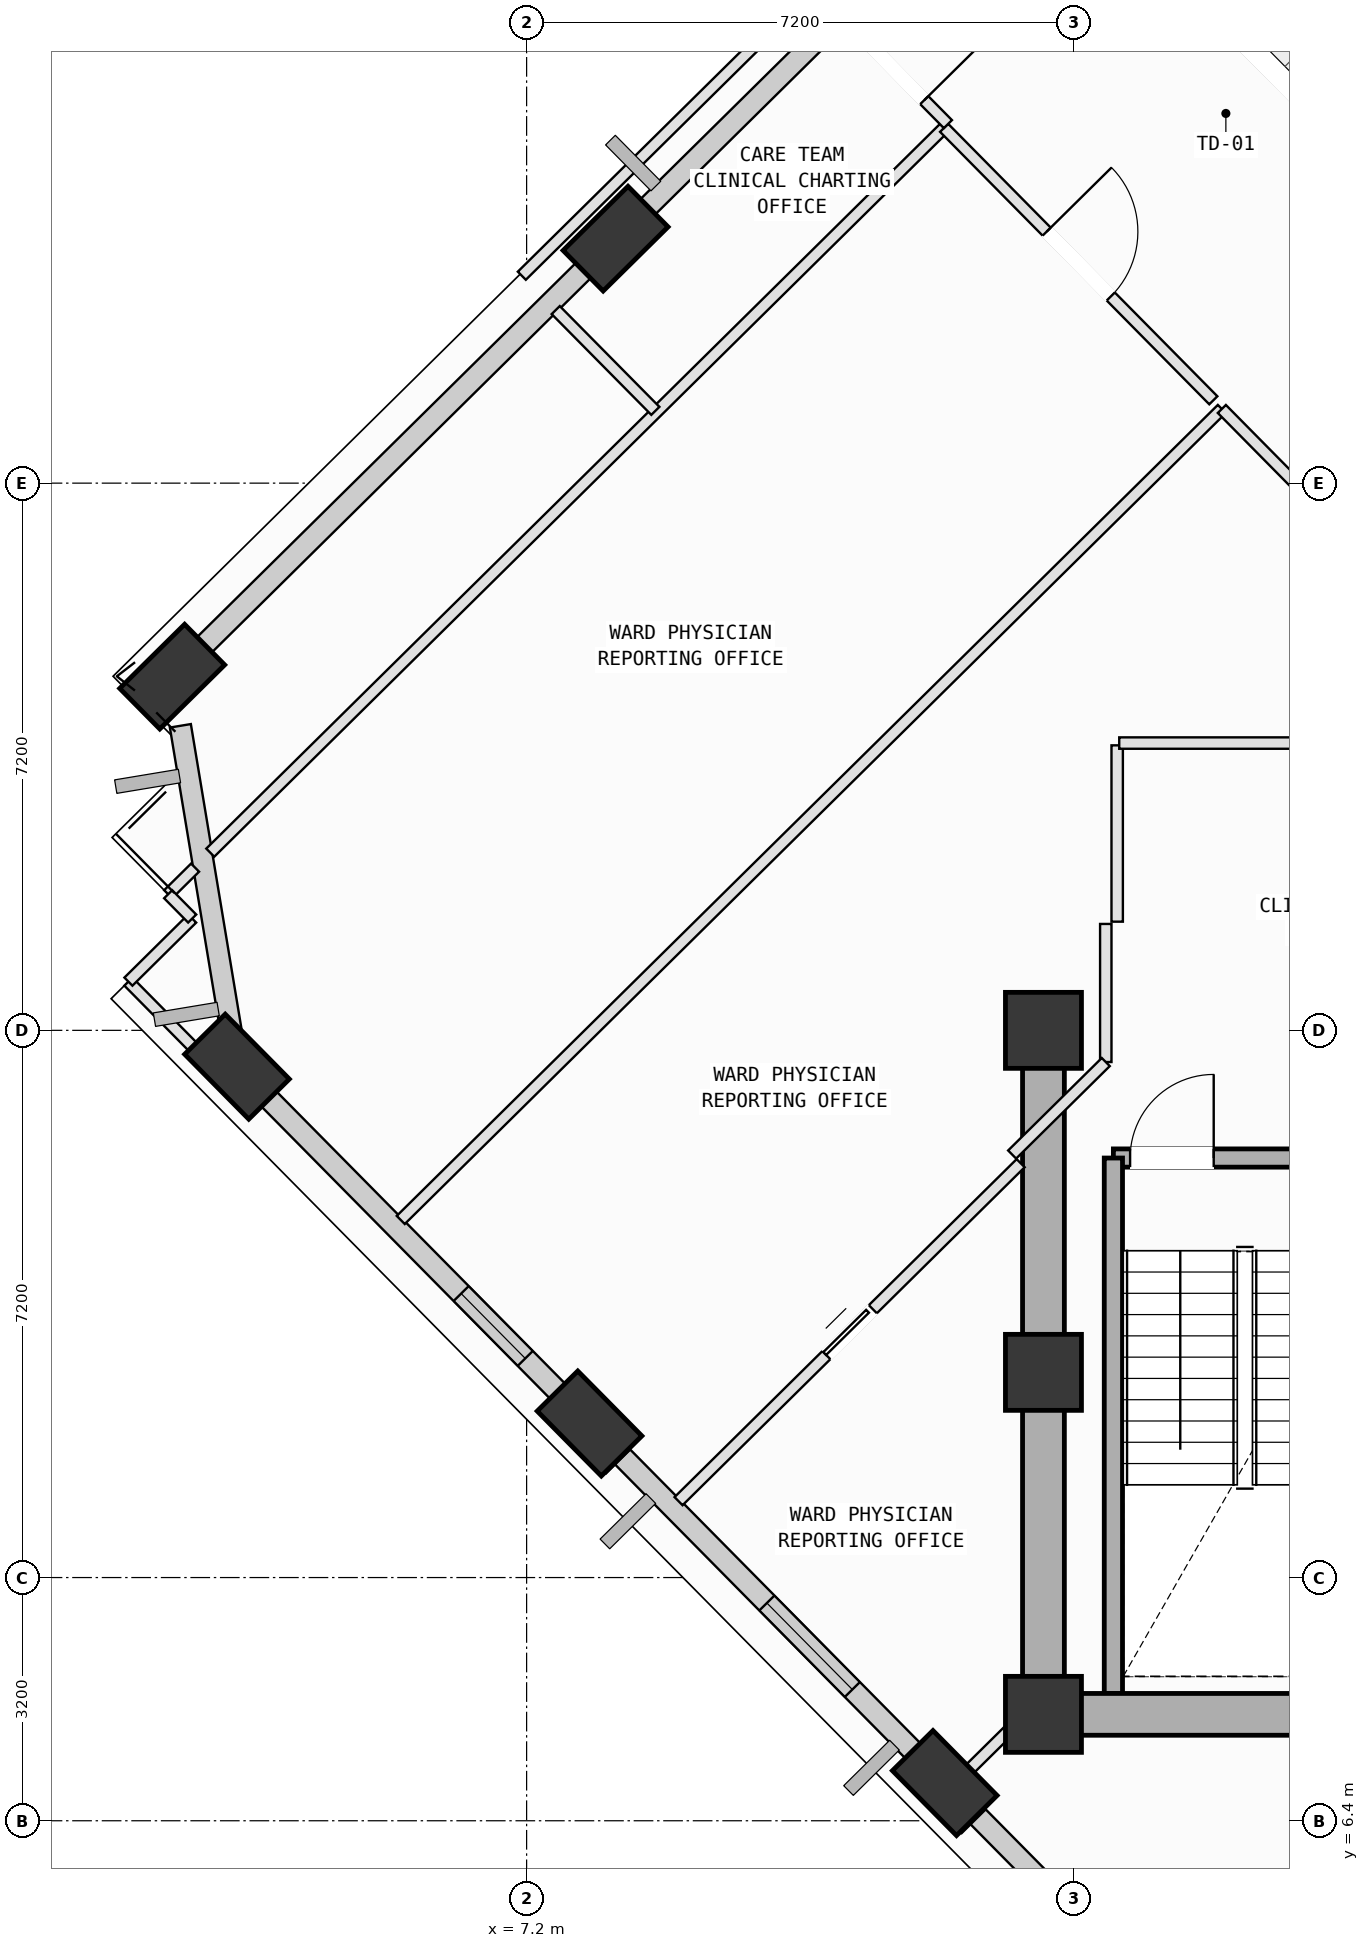
"""IFC4 building model, lengths in metres.
Left out: names, types, materials, properties, quantities, classifications, styles, units other than length and angle.
Written with IfcOpenShell. Run it as: python <this file> out.ifc"""

import sys

from ifc_helpers import new_model, si_unit, direction, frame, frame_2d, origin, origin_2d, place, context, subcontext, project, spatial, rectangle, extrude, element, fill, save


model = new_model("IFC4")
c1 = context("Model", 3, precision=1e-05, world=origin(), true_north=direction((0.0, 1.0)))
c2 = subcontext(c1, "Body", "Model", "MODEL_VIEW")
j1 = project(units=[si_unit("LENGTHUNIT", "METRE"), si_unit("PLANEANGLEUNIT", "RADIAN")], contexts=[c1])
p1 = place(None, origin())
s1 = spatial("IfcSite", under=j1, at=p1, CompositionType="ELEMENT")
p2 = place(p1, origin())
s2 = spatial("IfcBuilding", under=s1, at=p2, CompositionType="ELEMENT")
p3 = place(p2, frame((0.0, 0.0, 215.2)))
s3 = spatial("IfcBuildingStorey", under=s2, at=p3, CompositionType="ELEMENT", Elevation=215.2)
for number, where, z_axis, x_axis in (
    (1, (14.0, 7.8, 0.0), (0.0, 0.0, 1.0), (1.0, 0.0, 0.0)),
    (2, (14.0, 12.3, 0.0), (0.0, 0.0, 1.0), (1.0, 0.0, 0.0)),
    (3, (14.0, 16.8, 0.0), (0.0, 0.0, 1.0), (1.0, 0.0, 0.0)),
):
    element("IfcColumn", number, at=place(p3, frame(where, z_axis=z_axis, x_axis=x_axis)), inside=s3, PredefinedType="COLUMN", context=c2, shape_type="SweptSolid", body=[
        extrude(rectangle(XDim=1.0, YDim=1.0, at=origin_2d()), origin(), (0.0, 0.0, 1.0), 4.0),
    ])
p4 = place(p3, frame((8.371, 27.217, 0.002), z_axis=(-0.009113457738, -0.104136443749, 0.994521264716), x_axis=(0.769637431424, 0.634240685776, 0.073464118158)))
e4 = element("IfcColumn", 4, at=p4, inside=s3, PredefinedType="COLUMN", context=c2, shape_type="SweptSolid", body=[
    extrude(rectangle(XDim=1.2, YDim=0.75, at=origin_2d()), origin(), (0.0, 0.0, 1.0), 4.018),
])
p5 = place(p3, frame((2.537, 21.454, 0.002), z_axis=(0.014782864541, -0.127532499424, 0.991724219986), x_axis=(0.626431108804, 0.77423718396, 0.090226652922)))
e5 = element("IfcColumn", 5, at=p5, inside=s3, PredefinedType="COLUMN", context=c2, shape_type="SweptSolid", body=[
    extrude(rectangle(XDim=1.2, YDim=0.75, at=origin_2d()), origin(), (0.0, 0.0, 1.0), 4.03),
])
p6 = place(p3, frame((3.39, 16.322, 0.002), z_axis=(0.035863862528, -0.123887835929, 0.991647915075), x_axis=(-0.871227434349, 0.482228099616, 0.091754114781)))
e6 = element("IfcColumn", 6, at=p6, inside=s3, PredefinedType="COLUMN", context=c2, shape_type="SweptSolid", body=[
    extrude(rectangle(XDim=1.2, YDim=0.75, at=origin_2d()), origin(), (0.0, 0.0, 1.0), 4.03),
])
p7 = place(p3, frame((8.028, 11.627, 0.002), z_axis=(0.055080788667, -0.104762689458, 0.992970737543), x_axis=(-0.950778623185, 0.298211129608, 0.084202920807)))
e7 = element("IfcColumn", 7, at=p7, inside=s3, PredefinedType="COLUMN", context=c2, shape_type="SweptSolid", body=[
    extrude(rectangle(XDim=1.2, YDim=0.75, at=origin_2d()), origin(), (0.0, 0.0, 1.0), 4.025),
])
p8 = place(p3, frame((12.701, 6.896, 0.002), z_axis=(0.074475583784, -0.085461794595, 0.993554059468), x_axis=(-0.994199115032, 0.071165005168, 0.080645283244)))
e8 = element("IfcColumn", 8, at=p8, inside=s3, PredefinedType="COLUMN", context=c2, shape_type="SweptSolid", body=[
    extrude(rectangle(XDim=1.2, YDim=0.75, at=origin_2d()), origin(), (0.0, 0.0, 1.0), 4.022),
])
p9 = place(p3, frame((15.802, 30.665, 0.0), z_axis=(0.0, 0.0, 1.0), x_axis=(0.702761539953, -0.711425483071, 0.0)))
e9 = element("IfcWall", 9, at=p9, inside=s3, PredefinedType="SOLIDWALL", context=c2, shape_type="SweptSolid", body=[
    extrude(rectangle(XDim=6.96, YDim=0.24, at=frame_2d((3.48, 0.0))), origin(), (0.0, 0.0, 1.0), 3.265),
])
p10 = place(p9, frame((1.151, 0.0, 0.0)))
e10 = element("IfcOpeningElement", 10, at=p10, cuts=e9, PredefinedType="OPENING", context=c2, shape_type="SweptSolid", body=[
    extrude(rectangle(XDim=1.1, YDim=2.15, at=frame_2d((0.55, 1.075))), frame((0.0, 0.13, 0.0), z_axis=(0.0, -1.0, 0.0), x_axis=(1.0, 0.0, 0.0)), (0.0, 0.0, 1.0), 0.26),
])
p11 = place(p3, frame((8.522, 27.367, 0.0), z_axis=(0.0, 0.0, 1.0), x_axis=(0.711412048905, 0.702775139481, 0.0)))
e11 = element("IfcWall", 11, at=p11, inside=s3, PredefinedType="SOLIDWALL", context=c2, shape_type="SweptSolid", body=[
    extrude(rectangle(XDim=7.434, YDim=0.28, at=frame_2d((3.717, 0.0))), origin(), (0.0, 0.0, 1.0), 3.265),
])
p12 = place(p3, frame((2.666, 21.582, 0.0), z_axis=(0.0, 0.0, 1.0), x_axis=(0.711415560766, 0.702771584443, 0.0)))
e12 = element("IfcWall", 12, at=p12, inside=s3, PredefinedType="SOLIDWALL", context=c2, shape_type="SweptSolid", body=[
    extrude(rectangle(XDim=7.485, YDim=0.28, at=frame_2d((3.742, 0.0))), origin(), (0.0, 0.0, 1.0), 3.265),
])
p13 = place(p3, frame((3.367, 16.458, 0.0), z_axis=(0.0, 0.0, 1.0), x_axis=(-0.163887019376, 0.986479115278, 0.0)))
e13 = element("IfcWall", 13, at=p13, inside=s3, PredefinedType="SOLIDWALL", context=c2, shape_type="SweptSolid", body=[
    extrude(rectangle(XDim=4.408, YDim=0.28, at=frame_2d((2.204, 0.0))), origin(), (0.0, 0.0, 1.0), 3.265),
])
p14 = place(p3, frame((7.913, 11.743, 0.0), z_axis=(0.0, 0.0, 1.0), x_axis=(-0.702759613108, 0.711427386445, 0.0)))
e14 = element("IfcWall", 14, at=p14, inside=s3, PredefinedType="SOLIDWALL", context=c2, shape_type="SweptSolid", body=[
    extrude(rectangle(XDim=5.831, YDim=0.28, at=frame_2d((2.915, 0.0))), origin(), (0.0, 0.0, 1.0), 3.265),
])
p15 = place(p14, frame((1.04, 0.0, 0.75)))
e15 = element("IfcOpeningElement", 15, at=p15, cuts=e14, PredefinedType="OPENING", context=c2, shape_type="SweptSolid", body=[
    extrude(rectangle(XDim=1.2, YDim=1.75, at=frame_2d((0.6, 0.875))), frame((0.0, 0.15, 0.0), z_axis=(0.0, -1.0, 0.0), x_axis=(1.0, 0.0, 0.0)), (0.0, 0.0, 1.0), 0.3),
])
p16 = place(p3, frame((12.582, 7.017, 0.0), z_axis=(0.0, 0.0, 1.0), x_axis=(-0.702761134533, 0.711425883554, 0.0)))
e16 = element("IfcWall", 16, at=p16, inside=s3, PredefinedType="SOLIDWALL", context=c2, shape_type="SweptSolid", body=[
    extrude(rectangle(XDim=5.861, YDim=0.28, at=frame_2d((2.93, 0.0))), origin(), (0.0, 0.0, 1.0), 3.265),
])
p17 = place(p16, frame((1.56, 0.0, 0.75)))
e17 = element("IfcOpeningElement", 17, at=p17, cuts=e16, PredefinedType="OPENING", context=c2, shape_type="SweptSolid", body=[
    extrude(rectangle(XDim=1.6, YDim=1.95, at=frame_2d((0.8, 0.975))), frame((0.0, 0.15, 0.0), z_axis=(0.0, -1.0, 0.0), x_axis=(1.0, 0.0, 0.0)), (0.0, 0.0, 1.0), 0.3),
])
p18 = place(p3, frame((18.452, 1.074, 0.0), z_axis=(0.0, 0.0, 1.0), x_axis=(-0.702781594426, 0.711405672269, 0.0)))
e18 = element("IfcWall", 18, at=p18, inside=s3, PredefinedType="SOLIDWALL", context=c2, shape_type="SweptSolid", body=[
    extrude(rectangle(XDim=7.559, YDim=0.28, at=frame_2d((3.779, 0.0))), origin(), (0.0, 0.0, 1.0), 3.265),
])
p19 = place(p18, frame((4.406, 0.0, 0.75)))
e19 = element("IfcOpeningElement", 19, at=p19, cuts=e18, PredefinedType="OPENING", context=c2, shape_type="SweptSolid", body=[
    extrude(rectangle(XDim=2.0, YDim=1.95, at=frame_2d((1.0, 0.975))), frame((0.0, 0.15, 0.0), z_axis=(0.0, -1.0, 0.0), x_axis=(1.0, 0.0, 0.0)), (0.0, 0.0, 1.0), 0.3),
])
p20 = place(p3, frame((14.92, 15.12, 0.0), z_axis=(0.0, 0.0, 1.0), x_axis=(1.0, 0.0, 0.0)))
e20 = element("IfcWall", 20, at=p20, inside=s3, PredefinedType="SOLIDWALL", context=c2, shape_type="SweptSolid", body=[
    extrude(rectangle(XDim=3.46, YDim=0.24, at=frame_2d((1.73, 0.0))), origin(), (0.0, 0.0, 1.0), 3.78),
])
p21 = place(p20, frame((0.22, 0.0, 0.0)))
e21 = element("IfcOpeningElement", 21, at=p21, cuts=e20, PredefinedType="OPENING", context=c2, shape_type="SweptSolid", body=[
    extrude(rectangle(XDim=1.1, YDim=2.15, at=frame_2d((0.55, 1.075))), frame((0.0, 0.13, 0.0), z_axis=(0.0, -1.0, 0.0), x_axis=(1.0, 0.0, 0.0)), (0.0, 0.0, 1.0), 0.26),
])
p22 = place(p3, frame((14.92, 8.075, 0.0), z_axis=(0.0, 0.0, 1.0), x_axis=(0.0, 1.0, 0.0)))
e22 = element("IfcWall", 22, at=p22, inside=s3, PredefinedType="SOLIDWALL", context=c2, shape_type="SweptSolid", body=[
    extrude(rectangle(XDim=7.045, YDim=0.24, at=frame_2d((3.522, 0.0))), origin(), (0.0, 0.0, 1.0), 3.78),
])
p23 = place(p3, frame((14.0, 7.8, 0.0), z_axis=(0.0, 0.0, 1.0), x_axis=(1.0, 0.0, 0.0)))
e23 = element("IfcWall", 23, at=p23, inside=s3, PredefinedType="SHEAR", context=c2, shape_type="SweptSolid", body=[
    extrude(rectangle(XDim=10.8, YDim=0.55, at=frame_2d((5.4, 0.0))), origin(), (0.0, 0.0, 1.0), 3.78),
])
p24 = place(p3, frame((14.0, 16.8, 0.0), z_axis=(0.0, 0.0, 1.0), x_axis=(0.0, -1.0, 0.0)))
e24 = element("IfcWall", 24, at=p24, inside=s3, PredefinedType="SHEAR", context=c2, shape_type="SweptSolid", body=[
    extrude(rectangle(XDim=9.0, YDim=0.55, at=frame_2d((4.5, 0.0))), origin(), (0.0, 0.0, 1.0), 3.78),
])
p25 = place(p3, frame((12.977, 6.29, 0.0), z_axis=(0.0, 0.0, 1.0), x_axis=(-0.703375424574, 0.71081855076, 0.0)))
e25 = element("IfcWall", 25, at=p25, inside=s3, PredefinedType="PARTITIONING", context=c2, shape_type="SweptSolid", body=[
    extrude(rectangle(XDim=0.525, YDim=0.15, at=frame_2d((0.262, 0.0))), origin(), (0.0, 0.0, 1.0), 3.265),
])
p26 = place(p3, frame((12.608, 6.663, 0.0), z_axis=(0.0, 0.0, 1.0), x_axis=(0.711387834121, 0.702799651013, 0.0)))
e26 = element("IfcWall", 26, at=p26, inside=s3, PredefinedType="PARTITIONING", context=c2, shape_type="SweptSolid", body=[
    extrude(rectangle(XDim=1.535, YDim=0.15, at=frame_2d((0.768, 0.0))), origin(), (0.0, 0.0, 1.0), 3.78),
])
p27 = place(p3, frame((9.199, 10.605, 0.0), z_axis=(0.0, 0.0, 1.0), x_axis=(0.71135759635, 0.702830256971, 0.0)))
e27 = element("IfcWall", 27, at=p27, inside=s3, PredefinedType="PARTITIONING", context=c2, shape_type="SweptSolid", body=[
    extrude(rectangle(XDim=6.327, YDim=0.15, at=frame_2d((3.164, 0.0))), origin(), (0.0, 0.0, 1.0), 3.78),
])
p28 = place(p27, frame((2.734, 0.0, 0.0)))
e28 = element("IfcOpeningElement", 28, at=p28, cuts=e27, PredefinedType="OPENING", context=c2, shape_type="SweptSolid", body=[
    extrude(rectangle(XDim=0.86, YDim=2.06, at=frame_2d((0.43, 1.03))), frame((0.0, 0.085, 0.0), z_axis=(0.0, -1.0, 0.0), x_axis=(1.0, 0.0, 0.0)), (0.0, 0.0, 1.0), 0.17),
])
p29 = place(p3, frame((14.97, 20.55, 0.0), z_axis=(0.0, 0.0, 1.0), x_axis=(0.0, -1.0, 0.0)))
e29 = element("IfcWall", 29, at=p29, inside=s3, PredefinedType="PARTITIONING", context=c2, shape_type="SweptSolid", body=[
    extrude(rectangle(XDim=2.32, YDim=0.15, at=frame_2d((1.16, 0.0))), origin(), (0.0, 0.0, 1.0), 3.78),
])
p30 = place(p3, frame((14.82, 18.2, 0.0), z_axis=(0.0, 0.0, 1.0), x_axis=(0.0, -1.0, 0.0)))
e30 = element("IfcWall", 30, at=p30, inside=s3, PredefinedType="PARTITIONING", context=c2, shape_type="SweptSolid", body=[
    extrude(rectangle(XDim=1.817, YDim=0.15, at=frame_2d((0.908, 0.0))), origin(), (0.0, 0.0, 1.0), 3.78),
])
p31 = place(p3, frame((14.82, 16.383, 0.0), z_axis=(0.0, 0.0, 1.0), x_axis=(-0.711463271884, -0.702723283206, 0.0)))
e31 = element("IfcWall", 31, at=p31, inside=s3, PredefinedType="PARTITIONING", context=c2, shape_type="SweptSolid", body=[
    extrude(rectangle(XDim=1.732, YDim=0.15, at=frame_2d((0.866, 0.0))), origin(), (0.0, 0.0, 1.0), 3.78),
])
p32 = place(p3, frame((8.299, 11.024, 0.0), z_axis=(0.0, 0.0, 1.0), x_axis=(-0.702570675203, 0.711613972842, 0.0)))
e32 = element("IfcWall", 32, at=p32, inside=s3, PredefinedType="PARTITIONING", context=c2, shape_type="SweptSolid", body=[
    extrude(rectangle(XDim=0.783, YDim=0.15, at=frame_2d((0.392, 0.0))), origin(), (0.0, 0.0, 1.0), 3.265),
])
p33 = place(p3, frame((5.544, 14.305, 0.0), z_axis=(0.0, 0.0, 1.0), x_axis=(0.711434510245, 0.702752401371, 0.0)))
e33 = element("IfcWall", 33, at=p33, inside=s3, PredefinedType="PARTITIONING", context=c2, shape_type="SweptSolid", body=[
    extrude(rectangle(XDim=15.185, YDim=0.15, at=frame_2d((7.592, 0.0))), origin(), (0.0, 0.0, 1.0), 3.78),
])
p34 = place(p3, frame((16.347, 24.976, 0.0), z_axis=(0.0, 0.0, 1.0), x_axis=(0.702830826081, -0.711357034062, 0.0)))
e34 = element("IfcWall", 34, at=p34, inside=s3, PredefinedType="PARTITIONING", context=c2, shape_type="SweptSolid", body=[
    extrude(rectangle(XDim=5.04, YDim=0.15, at=frame_2d((2.52, 0.0))), origin(), (0.0, 0.0, 1.0), 3.78),
])
p35 = place(p34, frame((1.92, 0.0, 0.0)))
e35 = element("IfcOpeningElement", 35, at=p35, cuts=e34, PredefinedType="OPENING", context=c2, shape_type="SweptSolid", body=[
    extrude(rectangle(XDim=1.2, YDim=2.15, at=frame_2d((0.6, 1.075))), frame((0.0, 0.085, 0.0), z_axis=(0.0, -1.0, 0.0), x_axis=(1.0, 0.0, 0.0)), (0.0, 0.0, 1.0), 0.17),
])
p36 = place(p3, frame((19.069, 20.58, 0.0), z_axis=(0.0, 0.0, 1.0), x_axis=(-1.0, 0.0, 0.0)))
e36 = element("IfcWall", 36, at=p36, inside=s3, PredefinedType="PARTITIONING", context=c2, shape_type="SweptSolid", body=[
    extrude(rectangle(XDim=4.072, YDim=0.15, at=frame_2d((2.036, 0.0))), origin(), (0.0, 0.0, 1.0), 3.78),
])
p37 = place(p3, frame((2.484, 18.591, 0.0), z_axis=(0.0, 0.0, 1.0), x_axis=(0.711263966772, 0.70292500992, 0.0)))
e37 = element("IfcWall", 37, at=p37, inside=s3, PredefinedType="PARTITIONING", context=c2, shape_type="SweptSolid", body=[
    extrude(rectangle(XDim=0.498, YDim=0.15, at=frame_2d((0.249, 0.0))), origin(), (0.0, 0.0, 1.0), 3.78),
])
p38 = place(p3, frame((3.038, 19.138, 0.0), z_axis=(0.0, 0.0, 1.0), x_axis=(0.71143794273, 0.702748926462, 0.0)))
e38 = element("IfcWall", 38, at=p38, inside=s3, PredefinedType="PARTITIONING", context=c2, shape_type="SweptSolid", body=[
    extrude(rectangle(XDim=13.571, YDim=0.15, at=frame_2d((6.786, 0.0))), origin(), (0.0, 0.0, 1.0), 3.78),
])
p39 = place(p3, frame((12.693, 28.675, 0.0), z_axis=(0.0, 0.0, 1.0), x_axis=(0.702830826081, -0.711357034062, 0.0)))
e39 = element("IfcWall", 39, at=p39, inside=s3, PredefinedType="PARTITIONING", context=c2, shape_type="SweptSolid", body=[
    extrude(rectangle(XDim=5.04, YDim=0.15, at=frame_2d((2.52, 0.0))), origin(), (0.0, 0.0, 1.0), 3.78),
])
p40 = place(p39, frame((1.92, 0.0, 0.0)))
e40 = element("IfcOpeningElement", 40, at=p40, cuts=e39, PredefinedType="OPENING", context=c2, shape_type="SweptSolid", body=[
    extrude(rectangle(XDim=1.2, YDim=2.15, at=frame_2d((0.6, 1.075))), frame((0.0, 0.085, 0.0), z_axis=(0.0, -1.0, 0.0), x_axis=(1.0, 0.0, 0.0)), (0.0, 0.0, 1.0), 0.17),
])
p41 = place(p3, frame((3.652, 15.729, 0.0), z_axis=(0.0, 0.0, 1.0), x_axis=(-0.702781778597, 0.711405490331, 0.0)))
e41 = element("IfcWall", 41, at=p41, inside=s3, PredefinedType="PARTITIONING", context=c2, shape_type="SweptSolid", body=[
    extrude(rectangle(XDim=2.406, YDim=0.15, at=frame_2d((1.203, 0.0))), origin(), (0.0, 0.0, 1.0), 3.265),
])
p42 = place(p3, frame((1.961, 17.441, 0.0), z_axis=(0.0, 0.0, 1.0), x_axis=(0.71092304211, 0.703269811805, 0.0)))
e42 = element("IfcWall", 42, at=p42, inside=s3, PredefinedType="PARTITIONING", context=c2, shape_type="SweptSolid", body=[
    extrude(rectangle(XDim=1.18, YDim=0.15, at=frame_2d((0.59, 0.0))), origin(), (0.0, 0.0, 1.0), 3.78),
])
p43 = place(p3, frame((2.8, 18.271, 0.0), z_axis=(0.0, 0.0, 1.0), x_axis=(-0.702752128253, 0.71143478003, 0.0)))
e43 = element("IfcWall", 43, at=p43, inside=s3, PredefinedType="PARTITIONING", context=c2, shape_type="SweptSolid", body=[
    extrude(rectangle(XDim=0.45, YDim=0.15, at=frame_2d((0.225, 0.0))), origin(), (0.0, 0.0, 1.0), 3.78),
])
p44 = place(p3, frame((11.418, 30.066, 0.0), z_axis=(0.0, 0.0, 1.0), x_axis=(0.702626007323, -0.711559339643, 0.0)))
e44 = element("IfcWall", 44, at=p44, inside=s3, PredefinedType="PARTITIONING", context=c2, shape_type="SweptSolid", body=[
    extrude(rectangle(XDim=1.886, YDim=0.15, at=frame_2d((0.943, 0.0))), origin(), (0.0, 0.0, 1.0), 3.78),
])
p45 = place(p44, frame((0.443, 0.0, 0.0)))
e45 = element("IfcOpeningElement", 45, at=p45, cuts=e44, PredefinedType="OPENING", context=c2, shape_type="SweptSolid", body=[
    extrude(rectangle(XDim=1.0, YDim=2.12, at=frame_2d((0.5, 1.06))), frame((0.0, 0.085, 0.0), z_axis=(0.0, -1.0, 0.0), x_axis=(1.0, 0.0, 0.0)), (0.0, 0.0, 1.0), 0.17),
])
p46 = place(p3, frame((8.894, 24.951, 0.0), z_axis=(0.0, 0.0, 1.0), x_axis=(-0.703036635776, 0.711153632316, 0.0)))
e46 = element("IfcWall", 46, at=p46, inside=s3, PredefinedType="PARTITIONING", context=c2, shape_type="SweptSolid", body=[
    extrude(rectangle(XDim=1.865, YDim=0.15, at=frame_2d((0.932, 0.0))), origin(), (0.0, 0.0, 1.0), 3.78),
])
p47 = place(p3, frame((7.137, 26.729, 0.0), z_axis=(0.0, 0.0, 1.0), x_axis=(0.711441412602, 0.70274541367, 0.0)))
e47 = element("IfcWall", 47, at=p47, inside=s3, PredefinedType="PARTITIONING", context=c2, shape_type="SweptSolid", body=[
    extrude(rectangle(XDim=5.39, YDim=0.15, at=frame_2d((2.695, 0.0))), origin(), (0.0, 0.0, 1.0), 3.78),
])
p48 = place(p10, origin())
e48 = element("IfcDoor", 48, at=p48, inside=s3, OperationType="SINGLE_SWING_LEFT", PredefinedType="DOOR", context=c2, shape_type="SweptSolid", body=[
    extrude(rectangle(XDim=1.1, YDim=2.15, at=frame_2d((0.55, 1.075))), frame((0.0, 0.025, 0.0), z_axis=(0.0, -1.0, 0.0), x_axis=(1.0, 0.0, 0.0)), (0.0, 0.0, 1.0), 0.05),
])
fill(e10, e48)
p49 = place(p15, origin())
e49 = element("IfcWindow", 49, at=p49, inside=s3, PartitioningType="SINGLE_PANEL", PredefinedType="WINDOW", context=c2, shape_type="SweptSolid", body=[
    extrude(rectangle(XDim=1.2, YDim=1.75, at=frame_2d((0.6, 0.875))), frame((0.0, 0.03, 0.0), z_axis=(0.0, -1.0, 0.0), x_axis=(1.0, 0.0, 0.0)), (0.0, 0.0, 1.0), 0.06),
])
fill(e15, e49)
p50 = place(p17, origin())
e50 = element("IfcWindow", 50, at=p50, inside=s3, PartitioningType="SINGLE_PANEL", PredefinedType="WINDOW", context=c2, shape_type="SweptSolid", body=[
    extrude(rectangle(XDim=1.6, YDim=1.95, at=frame_2d((0.8, 0.975))), frame((0.0, 0.03, 0.0), z_axis=(0.0, -1.0, 0.0), x_axis=(1.0, 0.0, 0.0)), (0.0, 0.0, 1.0), 0.06),
])
fill(e17, e50)
p51 = place(p21, origin())
e51 = element("IfcDoor", 51, at=p51, inside=s3, OperationType="SINGLE_SWING_RIGHT", PredefinedType="DOOR", context=c2, shape_type="SweptSolid", body=[
    extrude(rectangle(XDim=1.1, YDim=2.15, at=frame_2d((0.55, 1.075))), frame((0.0, 0.025, 0.0), z_axis=(0.0, -1.0, 0.0), x_axis=(1.0, 0.0, 0.0)), (0.0, 0.0, 1.0), 0.05),
])
fill(e21, e51)
p52 = place(p40, origin())
e52 = element("IfcDoor", 52, at=p52, inside=s3, OperationType="SINGLE_SWING_LEFT", PredefinedType="DOOR", context=c2, shape_type="SweptSolid", body=[
    extrude(rectangle(XDim=1.2, YDim=2.15, at=frame_2d((0.6, 1.075))), frame((0.0, 0.025, 0.0), z_axis=(0.0, -1.0, 0.0), x_axis=(1.0, 0.0, 0.0)), (0.0, 0.0, 1.0), 0.05),
])
fill(e40, e52)
p53 = place(p45, origin())
e53 = element("IfcDoor", 53, at=p53, inside=s3, OperationType="SINGLE_SWING_RIGHT", PredefinedType="DOOR", context=c2, shape_type="SweptSolid", body=[
    extrude(rectangle(XDim=1.0, YDim=2.12, at=frame_2d((0.5, 1.06))), frame((0.0, 0.025, 0.0), z_axis=(0.0, -1.0, 0.0), x_axis=(1.0, 0.0, 0.0)), (0.0, 0.0, 1.0), 0.05),
])
fill(e45, e53)
p54 = place(p28, origin())
e54 = element("IfcDoor", 54, at=p54, inside=s3, OperationType="SLIDING_TO_LEFT", PredefinedType="DOOR", context=c2, shape_type="SweptSolid", body=[
    extrude(rectangle(XDim=0.86, YDim=2.06, at=frame_2d((0.43, 1.03))), frame((0.0, 0.025, 0.0), z_axis=(0.0, -1.0, 0.0), x_axis=(1.0, 0.0, 0.0)), (0.0, 0.0, 1.0), 0.05),
])
fill(e28, e54)
save(model, sys.argv[1])
